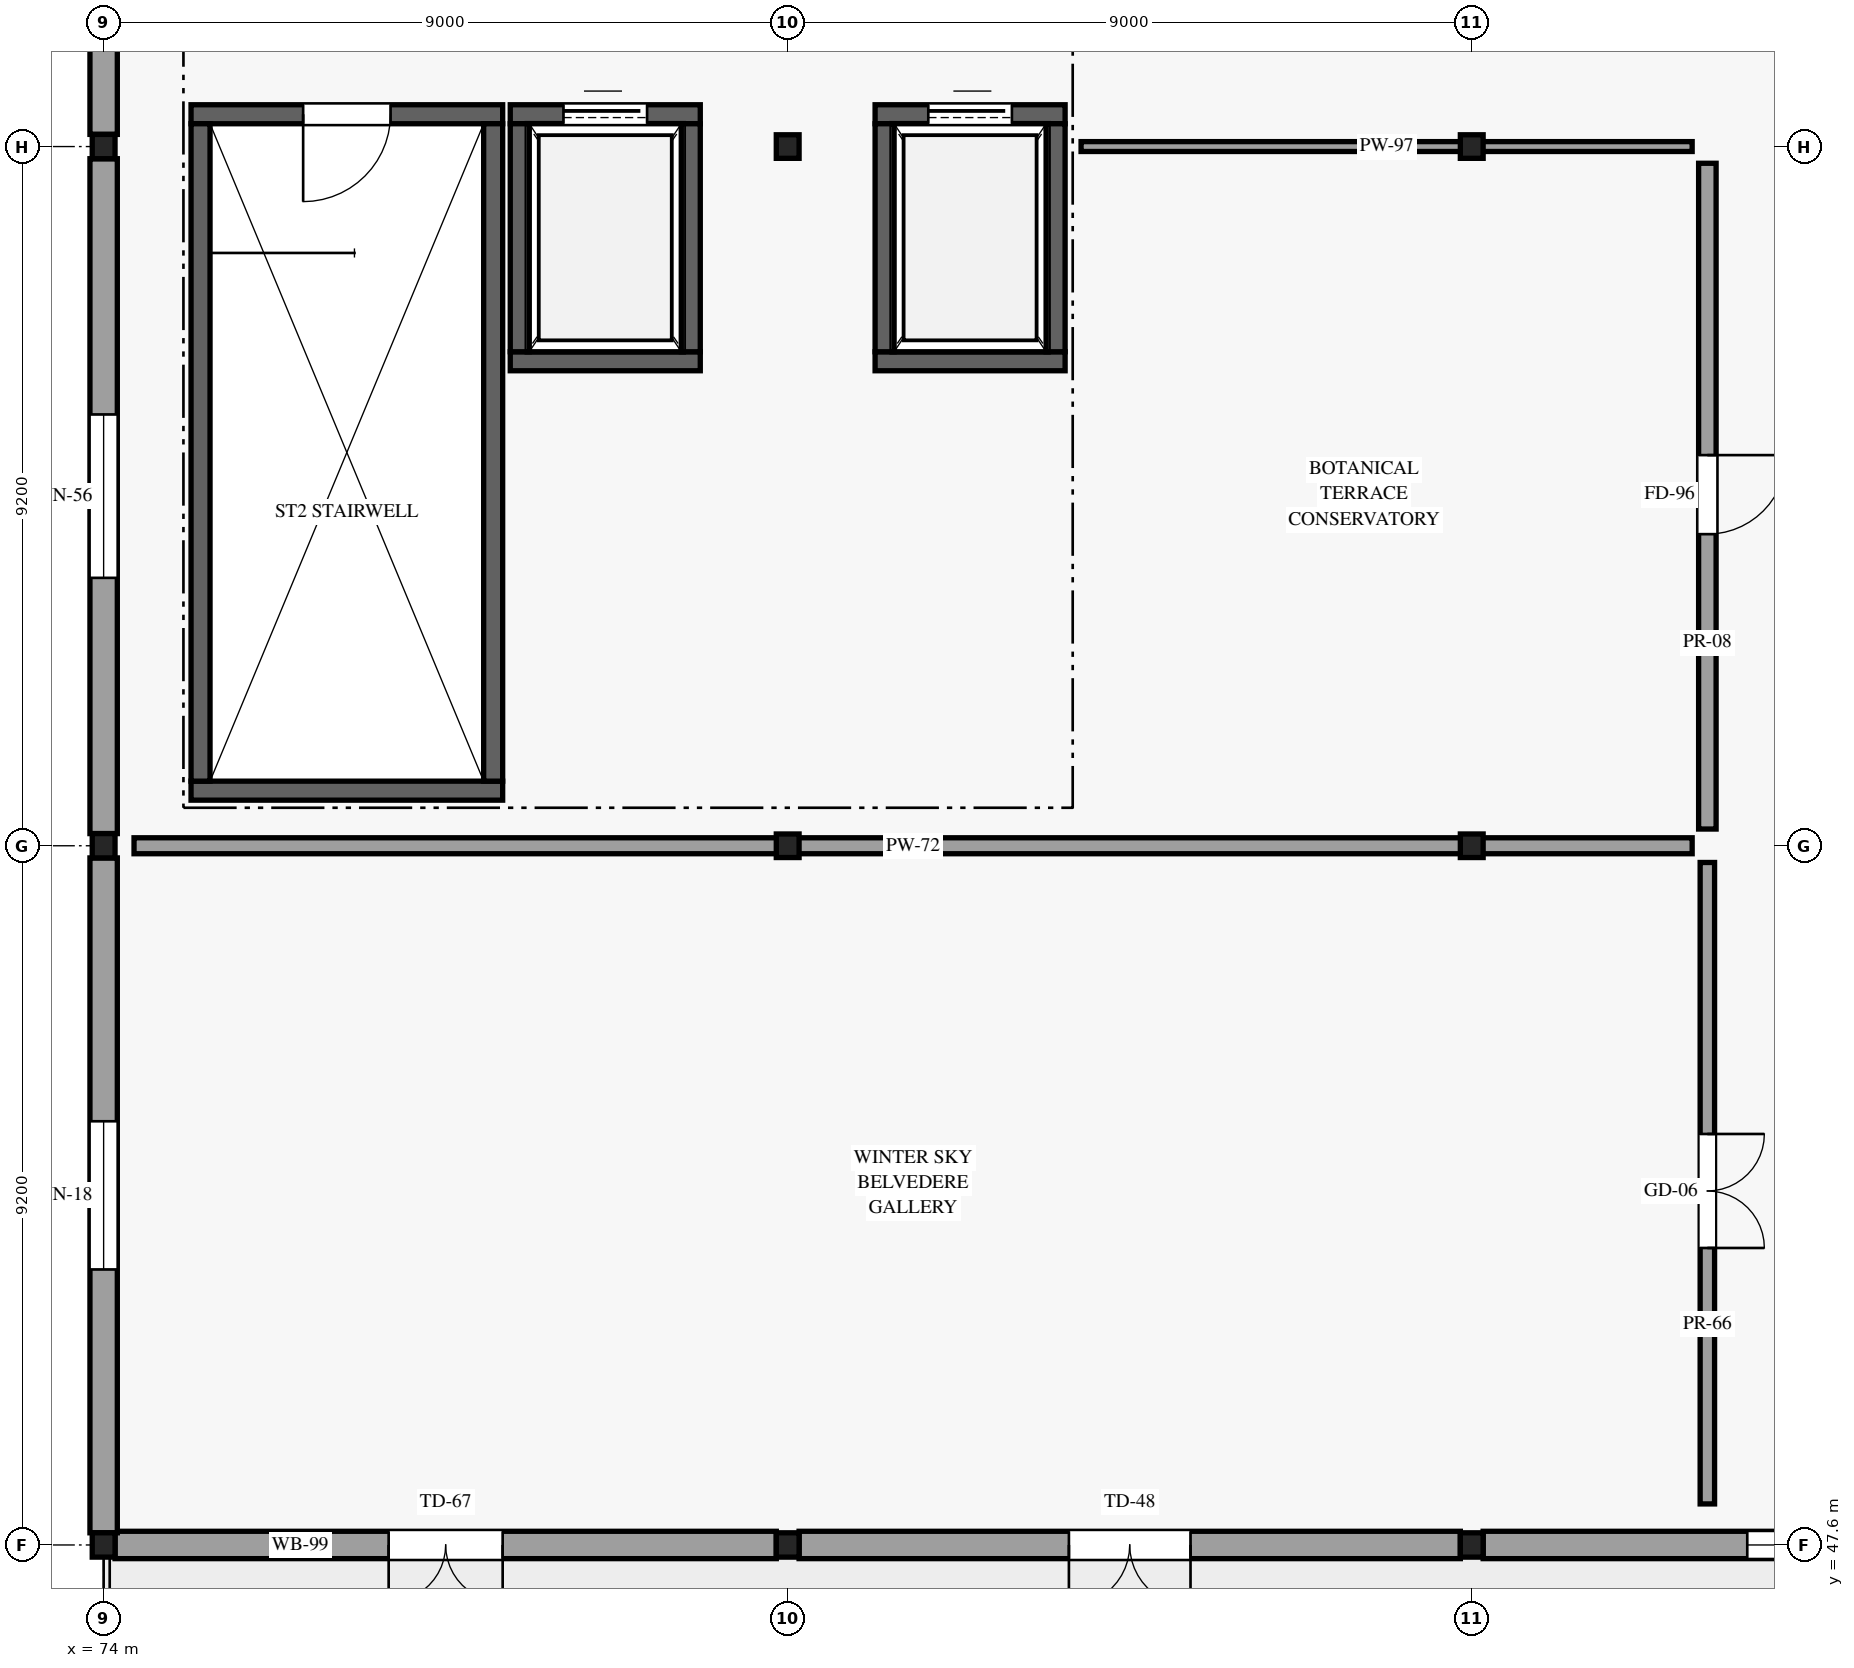
"""IFC4 building model, lengths in metres.
Left out: names, types, materials, properties, quantities, classifications, styles, units other than length and angle.
Written with IfcOpenShell. Run it as: python <this file> out.ifc"""

import sys

from ifc_helpers import new_model, si_unit, direction, frame, frame_2d, origin, origin_2d, place, context, subcontext, project, spatial, rectangle, i_section, extrude, element, fill, save


model = new_model("IFC4")
c1 = context("Model", 3, precision=1e-05, world=origin(), true_north=direction((0.0, 1.0)))
c2 = subcontext(c1, "Body", "Model", "MODEL_VIEW")
j1 = project(units=[si_unit("LENGTHUNIT", "METRE"), si_unit("PLANEANGLEUNIT", "RADIAN")], contexts=[c1])
p1 = place(None, origin())
s1 = spatial("IfcSite", under=j1, at=p1, CompositionType="ELEMENT")
p2 = place(p1, origin())
s2 = spatial("IfcBuilding", under=s1, at=p2, CompositionType="ELEMENT")
p3 = place(p2, frame((0.0, 0.0, 19.5)))
s3 = spatial("IfcBuildingStorey", under=s2, at=p3, CompositionType="ELEMENT", Elevation=19.5)
for number, where, z_axis, x_axis in (
    (1, (74.0, 47.6, 0.0), (0.0, 0.0, 1.0), (1.0, 0.0, 0.0)),
    (2, (74.0, 56.8, 0.0), (0.0, 0.0, 1.0), (1.0, 0.0, 0.0)),
    (3, (74.0, 66.0, 0.0), (0.0, 0.0, 1.0), (1.0, 0.0, 0.0)),
    (4, (83.0, 47.6, 0.0), (0.0, 0.0, 1.0), (1.0, 0.0, 0.0)),
):
    element("IfcColumn", number, at=place(p3, frame(where, z_axis=z_axis, x_axis=x_axis)), inside=s3, PredefinedType="COLUMN", context=c2, shape_type="SweptSolid", body=[
        extrude(i_section(OverallWidth=0.3, OverallDepth=0.32, WebThickness=0.011, FlangeThickness=0.021, FilletRadius=0.027, at=origin_2d()), origin(), (0.0, 0.0, 1.0), 4.5),
    ])
for number, where, z_axis, x_axis in (
    (5, (83.0, 56.8, 0.0), (0.0, 0.0, 1.0), (1.0, 0.0, 0.0)),
    (6, (83.0, 66.0, 0.0), (0.0, 0.0, 1.0), (1.0, 0.0, 0.0)),
):
    element("IfcColumn", number, at=place(p3, frame(where, z_axis=z_axis, x_axis=x_axis)), inside=s3, PredefinedType="COLUMN", context=c2, shape_type="SweptSolid", body=[
        extrude(i_section(OverallWidth=0.3, OverallDepth=0.31, WebThickness=0.009, FlangeThickness=0.015, FilletRadius=0.027, at=origin_2d()), origin(), (0.0, 0.0, 1.0), 4.5),
    ])
p4 = place(p3, frame((92.0, 47.6, 0.0), z_axis=(0.0, 0.0, 1.0), x_axis=(1.0, 0.0, 0.0)))
e7 = element("IfcColumn", 7, at=p4, inside=s3, PredefinedType="COLUMN", context=c2, shape_type="SweptSolid", body=[
    extrude(i_section(OverallWidth=0.3, OverallDepth=0.32, WebThickness=0.011, FlangeThickness=0.021, FilletRadius=0.027, at=origin_2d()), origin(), (0.0, 0.0, 1.0), 4.5),
])
for number, where, z_axis, x_axis in (
    (8, (92.0, 56.8, 0.0), (0.0, 0.0, 1.0), (1.0, 0.0, 0.0)),
    (9, (92.0, 66.0, 0.0), (0.0, 0.0, 1.0), (1.0, 0.0, 0.0)),
):
    element("IfcColumn", number, at=place(p3, frame(where, z_axis=z_axis, x_axis=x_axis)), inside=s3, PredefinedType="COLUMN", context=c2, shape_type="SweptSolid", body=[
        extrude(i_section(OverallWidth=0.3, OverallDepth=0.31, WebThickness=0.009, FlangeThickness=0.015, FilletRadius=0.027, at=origin_2d()), origin(), (0.0, 0.0, 1.0), 4.5),
    ])
p5 = place(p3, frame((74.15, 47.6, 0.0), z_axis=(0.0, 0.0, 1.0), x_axis=(1.0, 0.0, 0.0)))
e10 = element("IfcWall", 10, at=p5, inside=s3, PredefinedType="STANDARD", context=c2, shape_type="SweptSolid", body=[
    extrude(rectangle(XDim=8.7, YDim=0.36, at=frame_2d((4.35, 0.0))), origin(), (0.0, 0.0, 1.0), 3.805),
])
p6 = place(p5, frame((5.1, 0.0, 0.0), z_axis=(0.0, 0.0, 1.0), x_axis=(-1.0, 0.0, 0.0)))
e11 = element("IfcOpeningElement", 11, at=p6, cuts=e10, PredefinedType="OPENING", context=c2, shape_type="SweptSolid", body=[
    extrude(rectangle(XDim=1.5, YDim=2.3, at=frame_2d((0.75, 1.15))), frame((0.0, 0.19, 0.0), z_axis=(0.0, -1.0, 0.0), x_axis=(1.0, 0.0, 0.0)), (0.0, 0.0, 1.0), 0.38),
])
p7 = place(p3, frame((83.15, 47.6, 0.0), z_axis=(0.0, 0.0, 1.0), x_axis=(1.0, 0.0, 0.0)))
e12 = element("IfcWall", 12, at=p7, inside=s3, PredefinedType="STANDARD", context=c2, shape_type="SweptSolid", body=[
    extrude(rectangle(XDim=8.7, YDim=0.36, at=frame_2d((4.35, 0.0))), origin(), (0.0, 0.0, 1.0), 3.805),
])
p8 = place(p7, frame((5.15, 0.0, 0.0), z_axis=(0.0, 0.0, 1.0), x_axis=(-1.0, 0.0, 0.0)))
e13 = element("IfcOpeningElement", 13, at=p8, cuts=e12, PredefinedType="OPENING", context=c2, shape_type="SweptSolid", body=[
    extrude(rectangle(XDim=1.6, YDim=2.35, at=frame_2d((0.8, 1.175))), frame((0.0, 0.19, 0.0), z_axis=(0.0, -1.0, 0.0), x_axis=(1.0, 0.0, 0.0)), (0.0, 0.0, 1.0), 0.38),
])
p9 = place(p3, frame((92.15, 47.6, 0.0), z_axis=(0.0, 0.0, 1.0), x_axis=(1.0, 0.0, 0.0)))
e14 = element("IfcWall", 14, at=p9, inside=s3, PredefinedType="STANDARD", context=c2, shape_type="SweptSolid", body=[
    extrude(rectangle(XDim=8.7, YDim=0.36, at=frame_2d((4.35, 0.0))), origin(), (0.0, 0.0, 1.0), 3.805),
])
p10 = place(p9, frame((5.225, 0.0, 0.85), z_axis=(0.0, 0.0, 1.0), x_axis=(-1.0, 0.0, 0.0)))
e15 = element("IfcOpeningElement", 15, at=p10, cuts=e14, PredefinedType="OPENING", context=c2, shape_type="SweptSolid", body=[
    extrude(rectangle(XDim=1.75, YDim=2.05, at=frame_2d((0.875, 1.025))), frame((0.0, 0.19, 0.0), z_axis=(0.0, -1.0, 0.0), x_axis=(1.0, 0.0, 0.0)), (0.0, 0.0, 1.0), 0.38),
])
p11 = place(p3, frame((74.0, 47.76, 0.0), z_axis=(0.0, 0.0, 1.0), x_axis=(0.0, 1.0, 0.0)))
e16 = element("IfcWall", 16, at=p11, inside=s3, PredefinedType="STANDARD", context=c2, shape_type="SweptSolid", body=[
    extrude(rectangle(XDim=8.88, YDim=0.36, at=frame_2d((4.44, 0.0))), origin(), (0.0, 0.0, 1.0), 3.805),
])
p12 = place(p11, frame((3.465, 0.0, 0.85)))
e17 = element("IfcOpeningElement", 17, at=p12, cuts=e16, PredefinedType="OPENING", context=c2, shape_type="SweptSolid", body=[
    extrude(rectangle(XDim=1.95, YDim=2.15, at=frame_2d((0.975, 1.075))), frame((0.0, 0.19, 0.0), z_axis=(0.0, -1.0, 0.0), x_axis=(1.0, 0.0, 0.0)), (0.0, 0.0, 1.0), 0.38),
])
p13 = place(p3, frame((74.0, 56.96, 0.0), z_axis=(0.0, 0.0, 1.0), x_axis=(0.0, 1.0, 0.0)))
e18 = element("IfcWall", 18, at=p13, inside=s3, PredefinedType="STANDARD", context=c2, shape_type="SweptSolid", body=[
    extrude(rectangle(XDim=8.88, YDim=0.36, at=frame_2d((4.44, 0.0))), origin(), (0.0, 0.0, 1.0), 3.805),
])
p14 = place(p13, frame((3.365, 0.0, 0.85)))
e19 = element("IfcOpeningElement", 19, at=p14, cuts=e18, PredefinedType="OPENING", context=c2, shape_type="SweptSolid", body=[
    extrude(rectangle(XDim=2.15, YDim=2.25, at=frame_2d((1.075, 1.125))), frame((0.0, 0.19, 0.0), z_axis=(0.0, -1.0, 0.0), x_axis=(1.0, 0.0, 0.0)), (0.0, 0.0, 1.0), 0.38),
])
p15 = place(p3, frame((74.0, 66.16, 0.0), z_axis=(0.0, 0.0, 1.0), x_axis=(0.0, 1.0, 0.0)))
e20 = element("IfcWall", 20, at=p15, inside=s3, PredefinedType="STANDARD", context=c2, shape_type="SweptSolid", body=[
    extrude(rectangle(XDim=8.88, YDim=0.36, at=frame_2d((4.44, 0.0))), origin(), (0.0, 0.0, 1.0), 3.805),
])
p16 = place(p15, frame((3.265, 0.0, 0.85)))
e21 = element("IfcOpeningElement", 21, at=p16, cuts=e20, PredefinedType="OPENING", context=c2, shape_type="SweptSolid", body=[
    extrude(rectangle(XDim=2.35, YDim=2.35, at=frame_2d((1.175, 1.175))), frame((0.0, 0.19, 0.0), z_axis=(0.0, -1.0, 0.0), x_axis=(1.0, 0.0, 0.0)), (0.0, 0.0, 1.0), 0.38),
])
p17 = place(p3, frame((75.15, 66.425, 0.0), z_axis=(0.0, 0.0, 1.0), x_axis=(1.0, 0.0, 0.0)))
e22 = element("IfcWall", 22, at=p17, inside=s3, PredefinedType="SHEAR", context=c2, shape_type="SweptSolid", body=[
    extrude(rectangle(XDim=4.1, YDim=0.25, at=frame_2d((2.05, 0.0))), origin(), (0.0, 0.0, 1.0), 4.22),
])
p18 = place(p17, frame((2.625, 0.0, 0.0), z_axis=(0.0, 0.0, 1.0), x_axis=(-1.0, 0.0, 0.0)))
e23 = element("IfcOpeningElement", 23, at=p18, cuts=e22, PredefinedType="OPENING", context=c2, shape_type="SweptSolid", body=[
    extrude(rectangle(XDim=1.15, YDim=2.2, at=frame_2d((0.575, 1.1))), frame((0.0, 0.135, 0.0), z_axis=(0.0, -1.0, 0.0), x_axis=(1.0, 0.0, 0.0)), (0.0, 0.0, 1.0), 0.27),
])
p19 = place(p3, frame((75.15, 57.525, 0.0), z_axis=(0.0, 0.0, 1.0), x_axis=(1.0, 0.0, 0.0)))
e24 = element("IfcWall", 24, at=p19, inside=s3, PredefinedType="SHEAR", context=c2, shape_type="SweptSolid", body=[
    extrude(rectangle(XDim=4.1, YDim=0.25, at=frame_2d((2.05, 0.0))), origin(), (0.0, 0.0, 1.0), 4.22),
])
for number, where, z_axis, x_axis in (
    (25, (75.275, 57.65, 0.0), (0.0, 0.0, 1.0), (0.0, 1.0, 0.0)),
    (26, (79.125, 57.65, 0.0), (0.0, 0.0, 1.0), (0.0, 1.0, 0.0)),
):
    element("IfcWall", number, at=place(p3, frame(where, z_axis=z_axis, x_axis=x_axis)), inside=s3, PredefinedType="SHEAR", context=c2, shape_type="SweptSolid", body=[
        extrude(rectangle(XDim=8.65, YDim=0.25, at=frame_2d((4.325, 0.0))), origin(), (0.0, 0.0, 1.0), 4.22),
    ])
p20 = place(p3, frame((79.35, 66.425, 0.0), z_axis=(0.0, 0.0, 1.0), x_axis=(1.0, 0.0, 0.0)))
e27 = element("IfcWall", 27, at=p20, inside=s3, PredefinedType="SHEAR", context=c2, shape_type="SweptSolid", body=[
    extrude(rectangle(XDim=2.5, YDim=0.25, at=frame_2d((1.25, 0.0))), origin(), (0.0, 0.0, 1.0), 4.22),
])
p21 = place(p20, frame((0.7, 0.0, 0.0)))
e28 = element("IfcOpeningElement", 28, at=p21, cuts=e27, PredefinedType="OPENING", context=c2, shape_type="SweptSolid", body=[
    extrude(rectangle(XDim=1.1, YDim=2.2, at=frame_2d((0.55, 1.1))), frame((0.0, 0.135, 0.0), z_axis=(0.0, -1.0, 0.0), x_axis=(1.0, 0.0, 0.0)), (0.0, 0.0, 1.0), 0.27),
])
p22 = place(p3, frame((79.35, 63.175, 0.0), z_axis=(0.0, 0.0, 1.0), x_axis=(1.0, 0.0, 0.0)))
e29 = element("IfcWall", 29, at=p22, inside=s3, PredefinedType="SHEAR", context=c2, shape_type="SweptSolid", body=[
    extrude(rectangle(XDim=2.5, YDim=0.25, at=frame_2d((1.25, 0.0))), origin(), (0.0, 0.0, 1.0), 4.22),
])
for number, where, z_axis, x_axis in (
    (30, (81.725, 63.3, 0.0), (0.0, 0.0, 1.0), (0.0, 1.0, 0.0)),
    (31, (79.475, 63.3, 0.0), (0.0, 0.0, 1.0), (0.0, 1.0, 0.0)),
):
    element("IfcWall", number, at=place(p3, frame(where, z_axis=z_axis, x_axis=x_axis)), inside=s3, PredefinedType="SHEAR", context=c2, shape_type="SweptSolid", body=[
        extrude(rectangle(XDim=3.0, YDim=0.25, at=frame_2d((1.5, 0.0))), origin(), (0.0, 0.0, 1.0), 4.22),
    ])
p23 = place(p3, frame((84.15, 66.425, 0.0), z_axis=(0.0, 0.0, 1.0), x_axis=(1.0, 0.0, 0.0)))
e32 = element("IfcWall", 32, at=p23, inside=s3, PredefinedType="SHEAR", context=c2, shape_type="SweptSolid", body=[
    extrude(rectangle(XDim=2.5, YDim=0.25, at=frame_2d((1.25, 0.0))), origin(), (0.0, 0.0, 1.0), 4.22),
])
p24 = place(p23, frame((0.7, 0.0, 0.0)))
e33 = element("IfcOpeningElement", 33, at=p24, cuts=e32, PredefinedType="OPENING", context=c2, shape_type="SweptSolid", body=[
    extrude(rectangle(XDim=1.1, YDim=2.2, at=frame_2d((0.55, 1.1))), frame((0.0, 0.135, 0.0), z_axis=(0.0, -1.0, 0.0), x_axis=(1.0, 0.0, 0.0)), (0.0, 0.0, 1.0), 0.27),
])
p25 = place(p3, frame((84.15, 63.175, 0.0), z_axis=(0.0, 0.0, 1.0), x_axis=(1.0, 0.0, 0.0)))
e34 = element("IfcWall", 34, at=p25, inside=s3, PredefinedType="SHEAR", context=c2, shape_type="SweptSolid", body=[
    extrude(rectangle(XDim=2.5, YDim=0.25, at=frame_2d((1.25, 0.0))), origin(), (0.0, 0.0, 1.0), 4.22),
])
for number, where, z_axis, x_axis in (
    (35, (86.525, 63.3, 0.0), (0.0, 0.0, 1.0), (0.0, 1.0, 0.0)),
    (36, (84.275, 63.3, 0.0), (0.0, 0.0, 1.0), (0.0, 1.0, 0.0)),
):
    element("IfcWall", number, at=place(p3, frame(where, z_axis=z_axis, x_axis=x_axis)), inside=s3, PredefinedType="SHEAR", context=c2, shape_type="SweptSolid", body=[
        extrude(rectangle(XDim=3.0, YDim=0.25, at=frame_2d((1.5, 0.0))), origin(), (0.0, 0.0, 1.0), 4.22),
    ])
p26 = place(p3, frame((95.1, 48.14, 0.0), z_axis=(0.0, 0.0, 1.0), x_axis=(0.0, 1.0, 0.0)))
e37 = element("IfcWall", 37, at=p26, inside=s3, PredefinedType="PARTITIONING", context=c2, shape_type="SweptSolid", body=[
    extrude(rectangle(XDim=8.44, YDim=0.19, at=frame_2d((4.22, 0.0))), origin(), (0.0, 0.0, 1.0), 3.805),
])
p27 = place(p26, frame((4.868, 0.0, 0.0), z_axis=(0.0, 0.0, 1.0), x_axis=(-1.0, 0.0, 0.0)))
e38 = element("IfcOpeningElement", 38, at=p27, cuts=e37, PredefinedType="OPENING", context=c2, shape_type="SweptSolid", body=[
    extrude(rectangle(XDim=1.5, YDim=2.35, at=frame_2d((0.75, 1.175))), frame((0.0, 0.105, 0.0), z_axis=(0.0, -1.0, 0.0), x_axis=(1.0, 0.0, 0.0)), (0.0, 0.0, 1.0), 0.21),
])
p28 = place(p3, frame((74.4, 56.8, 0.0), z_axis=(0.0, 0.0, 1.0), x_axis=(1.0, 0.0, 0.0)))
e39 = element("IfcWall", 39, at=p28, inside=s3, PredefinedType="PARTITIONING", context=c2, shape_type="SweptSolid", body=[
    extrude(rectangle(XDim=20.5, YDim=0.21, at=frame_2d((10.25, 0.0))), origin(), (0.0, 0.0, 1.0), 3.805),
])
p29 = place(p3, frame((95.1, 57.02, 0.0), z_axis=(0.0, 0.0, 1.0), x_axis=(0.0, 1.0, 0.0)))
e40 = element("IfcWall", 40, at=p29, inside=s3, PredefinedType="PARTITIONING", context=c2, shape_type="SweptSolid", body=[
    extrude(rectangle(XDim=8.76, YDim=0.23, at=frame_2d((4.38, 0.0))), origin(), (0.0, 0.0, 1.0), 3.805),
])
p30 = place(p29, frame((4.92, 0.0, 0.0), z_axis=(0.0, 0.0, 1.0), x_axis=(-1.0, 0.0, 0.0)))
e41 = element("IfcOpeningElement", 41, at=p30, cuts=e40, PredefinedType="OPENING", context=c2, shape_type="SweptSolid", body=[
    extrude(rectangle(XDim=1.04, YDim=2.22, at=frame_2d((0.52, 1.11))), frame((0.0, 0.125, 0.0), z_axis=(0.0, -1.0, 0.0), x_axis=(1.0, 0.0, 0.0)), (0.0, 0.0, 1.0), 0.25),
])
p31 = place(p3, frame((86.86, 66.0, 0.0), z_axis=(0.0, 0.0, 1.0), x_axis=(1.0, 0.0, 0.0)))
e42 = element("IfcWall", 42, at=p31, inside=s3, PredefinedType="PARTITIONING", context=c2, shape_type="SweptSolid", body=[
    extrude(rectangle(XDim=8.04, YDim=0.13, at=frame_2d((4.02, 0.0))), origin(), (0.0, 0.0, 1.0), 3.805),
])
p32 = place(p6, origin())
e43 = element("IfcDoor", 43, at=p32, inside=s3, OperationType="DOUBLE_DOOR_SINGLE_SWING", PredefinedType="DOOR", context=c2, shape_type="SweptSolid", body=[
    extrude(rectangle(XDim=1.5, YDim=2.3, at=frame_2d((0.75, 1.15))), frame((0.0, 0.025, 0.0), z_axis=(0.0, -1.0, 0.0), x_axis=(1.0, 0.0, 0.0)), (0.0, 0.0, 1.0), 0.05),
])
fill(e11, e43)
p33 = place(p8, origin())
e44 = element("IfcDoor", 44, at=p33, inside=s3, OperationType="DOUBLE_DOOR_SINGLE_SWING", PredefinedType="DOOR", context=c2, shape_type="SweptSolid", body=[
    extrude(rectangle(XDim=1.6, YDim=2.35, at=frame_2d((0.8, 1.175))), frame((0.0, 0.025, 0.0), z_axis=(0.0, -1.0, 0.0), x_axis=(1.0, 0.0, 0.0)), (0.0, 0.0, 1.0), 0.05),
])
fill(e13, e44)
p34 = place(p10, origin())
e45 = element("IfcWindow", 45, at=p34, inside=s3, PartitioningType="SINGLE_PANEL", PredefinedType="WINDOW", context=c2, shape_type="SweptSolid", body=[
    extrude(rectangle(XDim=1.75, YDim=2.05, at=frame_2d((0.875, 1.025))), frame((0.0, 0.03, 0.0), z_axis=(0.0, -1.0, 0.0), x_axis=(1.0, 0.0, 0.0)), (0.0, 0.0, 1.0), 0.06),
])
fill(e15, e45)
p35 = place(p12, origin())
e46 = element("IfcWindow", 46, at=p35, inside=s3, PartitioningType="SINGLE_PANEL", PredefinedType="WINDOW", context=c2, shape_type="SweptSolid", body=[
    extrude(rectangle(XDim=1.95, YDim=2.15, at=frame_2d((0.975, 1.075))), frame((0.0, 0.03, 0.0), z_axis=(0.0, -1.0, 0.0), x_axis=(1.0, 0.0, 0.0)), (0.0, 0.0, 1.0), 0.06),
])
fill(e17, e46)
p36 = place(p14, origin())
e47 = element("IfcWindow", 47, at=p36, inside=s3, PartitioningType="SINGLE_PANEL", PredefinedType="WINDOW", context=c2, shape_type="SweptSolid", body=[
    extrude(rectangle(XDim=2.15, YDim=2.25, at=frame_2d((1.075, 1.125))), frame((0.0, 0.03, 0.0), z_axis=(0.0, -1.0, 0.0), x_axis=(1.0, 0.0, 0.0)), (0.0, 0.0, 1.0), 0.06),
])
fill(e19, e47)
p37 = place(p18, origin())
e48 = element("IfcDoor", 48, at=p37, inside=s3, OperationType="SINGLE_SWING_RIGHT", PredefinedType="DOOR", context=c2, shape_type="SweptSolid", body=[
    extrude(rectangle(XDim=1.15, YDim=2.2, at=frame_2d((0.575, 1.1))), frame((0.0, 0.025, 0.0), z_axis=(0.0, -1.0, 0.0), x_axis=(1.0, 0.0, 0.0)), (0.0, 0.0, 1.0), 0.05),
])
fill(e23, e48)
p38 = place(p21, origin())
e49 = element("IfcDoor", 49, at=p38, inside=s3, OperationType="SLIDING_TO_LEFT", PredefinedType="DOOR", context=c2, shape_type="SweptSolid", body=[
    extrude(rectangle(XDim=1.1, YDim=2.2, at=frame_2d((0.55, 1.1))), frame((0.0, 0.025, 0.0), z_axis=(0.0, -1.0, 0.0), x_axis=(1.0, 0.0, 0.0)), (0.0, 0.0, 1.0), 0.05),
])
fill(e28, e49)
p39 = place(p24, origin())
e50 = element("IfcDoor", 50, at=p39, inside=s3, OperationType="SLIDING_TO_RIGHT", PredefinedType="DOOR", context=c2, shape_type="SweptSolid", body=[
    extrude(rectangle(XDim=1.1, YDim=2.2, at=frame_2d((0.55, 1.1))), frame((0.0, 0.025, 0.0), z_axis=(0.0, -1.0, 0.0), x_axis=(1.0, 0.0, 0.0)), (0.0, 0.0, 1.0), 0.05),
])
fill(e33, e50)
p40 = place(p27, origin())
e51 = element("IfcDoor", 51, at=p40, inside=s3, OperationType="DOUBLE_DOOR_SINGLE_SWING", PredefinedType="DOOR", context=c2, shape_type="SweptSolid", body=[
    extrude(rectangle(XDim=1.5, YDim=2.35, at=frame_2d((0.75, 1.175))), frame((0.0, 0.025, 0.0), z_axis=(0.0, -1.0, 0.0), x_axis=(1.0, 0.0, 0.0)), (0.0, 0.0, 1.0), 0.05),
])
fill(e38, e51)
p41 = place(p30, origin())
e52 = element("IfcDoor", 52, at=p41, inside=s3, OperationType="SINGLE_SWING_LEFT", PredefinedType="DOOR", context=c2, shape_type="SweptSolid", body=[
    extrude(rectangle(XDim=1.04, YDim=2.22, at=frame_2d((0.52, 1.11))), frame((0.0, 0.025, 0.0), z_axis=(0.0, -1.0, 0.0), x_axis=(1.0, 0.0, 0.0)), (0.0, 0.0, 1.0), 0.05),
])
fill(e41, e52)
save(model, sys.argv[1])
